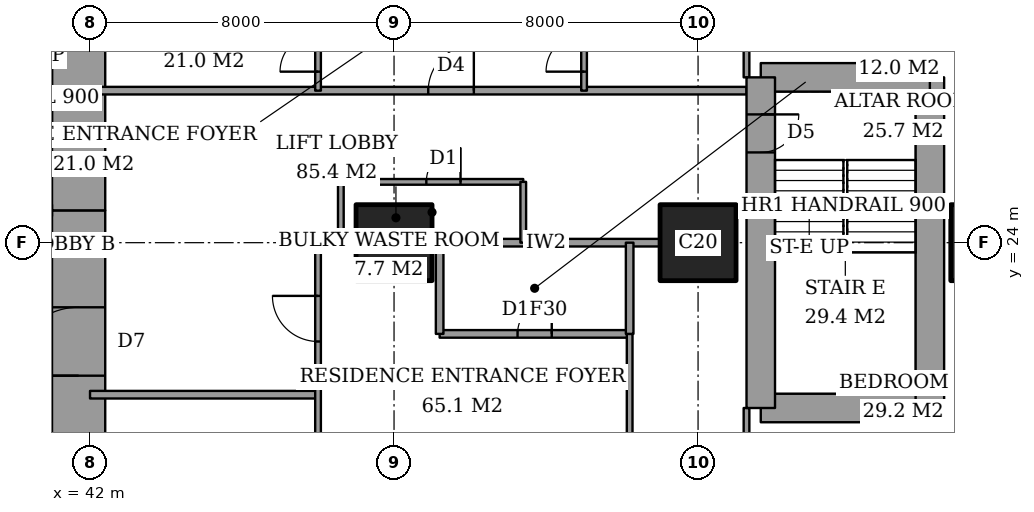
"""IFC4 building model, lengths in metres.
Left out: names, types, materials, properties, quantities, classifications, styles, units other than length and angle.
Written with IfcOpenShell. Run it as: python <this file> out.ifc"""

import sys

from ifc_helpers import new_model, si_unit, direction, frame, frame_2d, origin, origin_2d, place, context, subcontext, project, spatial, rectangle, extrude, element, fill, save


model = new_model("IFC4")
c1 = context("Model", 3, precision=1e-05, world=origin(), true_north=direction((0.0, 1.0)))
c2 = subcontext(c1, "Body", "Model", "MODEL_VIEW")
j1 = project(units=[si_unit("LENGTHUNIT", "METRE"), si_unit("PLANEANGLEUNIT", "RADIAN")], contexts=[c1])
p1 = place(None, origin())
s1 = spatial("IfcSite", under=j1, at=p1, CompositionType="ELEMENT")
p2 = place(p1, origin())
s2 = spatial("IfcBuilding", under=s1, at=p2, CompositionType="ELEMENT")
p3 = place(p2, frame((0.0, 0.0, 33.2)))
s3 = spatial("IfcBuildingStorey", under=s2, at=p3, CompositionType="ELEMENT", Elevation=33.2)
for number, where, z_axis, x_axis in (
    (1, (50.0, 24.0, 0.0), (0.0, 0.0, 1.0), (1.0, 0.0, 0.0)),
    (2, (58.0, 24.0, 0.0), (0.0, 0.0, 1.0), (1.0, 0.0, 0.0)),
    (3, (65.65, 24.0, 0.0), (0.0, 0.0, 1.0), (1.0, 0.0, 0.0)),
):
    element("IfcColumn", number, at=place(p3, frame(where, z_axis=z_axis, x_axis=x_axis)), inside=s3, PredefinedType="COLUMN", context=c2, shape_type="SweptSolid", body=[
        extrude(rectangle(XDim=2.0, YDim=2.0, at=origin_2d()), origin(), (0.0, 0.0, 1.0), 3.6),
    ])
p4 = place(p3, frame((41.7, 13.0, 0.0), z_axis=(0.0, 0.0, 1.0), x_axis=(0.0, 1.0, 0.0)))
e4 = element("IfcWall", 4, at=p4, inside=s3, PredefinedType="SHEAR", context=c2, shape_type="SweptSolid", body=[
    extrude(rectangle(XDim=11.85, YDim=1.4, at=frame_2d((5.925, 0.0))), origin(), (0.0, 0.0, 1.0), 3.6),
])
p5 = place(p4, frame((7.5, 0.0, 0.0)))
e5 = element("IfcOpeningElement", 5, at=p5, cuts=e4, PredefinedType="OPENING", context=c2, shape_type="SweptSolid", body=[
    extrude(rectangle(XDim=1.8, YDim=2.4, at=frame_2d((0.9, 1.2))), frame((0.0, 0.71, 0.0), z_axis=(0.0, -1.0, 0.0), x_axis=(1.0, 0.0, 0.0)), (0.0, 0.0, 1.0), 1.42),
])
p6 = place(p3, frame((41.7, 24.85, 0.0), z_axis=(0.0, 0.0, 1.0), x_axis=(0.0, 1.0, 0.0)))
e6 = element("IfcWall", 6, at=p6, inside=s3, PredefinedType="SHEAR", context=c2, shape_type="SweptSolid", body=[
    extrude(rectangle(XDim=10.15, YDim=1.4, at=frame_2d((5.075, 0.0))), origin(), (0.0, 0.0, 1.0), 3.6),
])
p7 = place(p3, frame((59.65, 19.65, 0.0), z_axis=(0.0, 0.0, 1.0), x_axis=(1.0, 0.0, 0.0)))
e7 = element("IfcWall", 7, at=p7, inside=s3, PredefinedType="SHEAR", context=c2, shape_type="SweptSolid", body=[
    extrude(rectangle(XDim=4.45, YDim=0.75, at=frame_2d((2.225, 0.0))), origin(), (0.0, 0.0, 1.0), 3.6),
])
p8 = place(p3, frame((64.1, 19.65, 0.0), z_axis=(0.0, 0.0, 1.0), x_axis=(0.0, 1.0, 0.0)))
e8 = element("IfcWall", 8, at=p8, inside=s3, PredefinedType="SHEAR", context=c2, shape_type="SweptSolid", body=[
    extrude(rectangle(XDim=8.7, YDim=0.75, at=frame_2d((4.35, 0.0))), origin(), (0.0, 0.0, 1.0), 3.6),
])
p9 = place(p3, frame((64.1, 28.35, 0.0), z_axis=(0.0, 0.0, 1.0), x_axis=(-1.0, 0.0, 0.0)))
e9 = element("IfcWall", 9, at=p9, inside=s3, PredefinedType="SHEAR", context=c2, shape_type="SweptSolid", body=[
    extrude(rectangle(XDim=4.45, YDim=0.75, at=frame_2d((2.225, 0.0))), origin(), (0.0, 0.0, 1.0), 3.6),
])
p10 = place(p3, frame((59.65, 28.35, 0.0), z_axis=(0.0, 0.0, 1.0), x_axis=(0.0, -1.0, 0.0)))
e10 = element("IfcWall", 10, at=p10, inside=s3, PredefinedType="SHEAR", context=c2, shape_type="SweptSolid", body=[
    extrude(rectangle(XDim=8.7, YDim=0.75, at=frame_2d((4.35, 0.0))), origin(), (0.0, 0.0, 1.0), 3.6),
])
p11 = place(p10, frame((0.975, 0.0, 0.0)))
e11 = element("IfcOpeningElement", 11, at=p11, cuts=e10, PredefinedType="OPENING", context=c2, shape_type="SweptSolid", body=[
    extrude(rectangle(XDim=1.0, YDim=2.1, at=frame_2d((0.5, 1.05))), frame((0.0, 0.385, 0.0), z_axis=(0.0, -1.0, 0.0), x_axis=(1.0, 0.0, 0.0)), (0.0, 0.0, 1.0), 0.77),
])
p12 = place(p3, frame((42.0, 20.0, 0.0), z_axis=(0.0, 0.0, 1.0), x_axis=(1.0, 0.0, 0.0)))
e12 = element("IfcWall", 12, at=p12, inside=s3, PredefinedType="PARTITIONING", context=c2, shape_type="SweptSolid", body=[
    extrude(rectangle(XDim=6.0, YDim=0.2, at=frame_2d((3.0, 0.0))), origin(), (0.0, 0.0, 1.0), 3.35),
])
p13 = place(p3, frame((51.2, 21.6, 0.0), z_axis=(0.0, 0.0, 1.0), x_axis=(1.0, 0.0, 0.0)))
e13 = element("IfcWall", 13, at=p13, inside=s3, PredefinedType="PARTITIONING", context=c2, shape_type="SweptSolid", body=[
    extrude(rectangle(XDim=5.0, YDim=0.2, at=frame_2d((2.5, 0.0))), origin(), (0.0, 0.0, 1.0), 3.35),
])
p14 = place(p13, frame((2.05, 0.0, 0.0)))
e14 = element("IfcOpeningElement", 14, at=p14, cuts=e13, PredefinedType="OPENING", context=c2, shape_type="SweptSolid", body=[
    extrude(rectangle(XDim=0.9, YDim=2.1, at=frame_2d((0.45, 1.05))), frame((0.0, 0.11, 0.0), z_axis=(0.0, -1.0, 0.0), x_axis=(1.0, 0.0, 0.0)), (0.0, 0.0, 1.0), 0.22),
])
p15 = place(p3, frame((48.0, 24.0, 0.0), z_axis=(0.0, 0.0, 1.0), x_axis=(1.0, 0.0, 0.0)))
e15 = element("IfcWall", 15, at=p15, inside=s3, PredefinedType="PARTITIONING", context=c2, shape_type="SweptSolid", body=[
    extrude(rectangle(XDim=1.0, YDim=0.2, at=frame_2d((0.5, 0.0))), origin(), (0.0, 0.0, 1.0), 3.35),
])
p16 = place(p3, frame((51.0, 24.0, 0.0), z_axis=(0.0, 0.0, 1.0), x_axis=(1.0, 0.0, 0.0)))
e16 = element("IfcWall", 16, at=p16, inside=s3, PredefinedType="PARTITIONING", context=c2, shape_type="SweptSolid", body=[
    extrude(rectangle(XDim=6.0, YDim=0.2, at=frame_2d((3.0, 0.0))), origin(), (0.0, 0.0, 1.0), 3.35),
])
p17 = place(p3, frame((48.6, 25.6, 0.0), z_axis=(0.0, 0.0, 1.0), x_axis=(1.0, 0.0, 0.0)))
e17 = element("IfcWall", 17, at=p17, inside=s3, PredefinedType="PARTITIONING", context=c2, shape_type="SweptSolid", body=[
    extrude(rectangle(XDim=4.8, YDim=0.15, at=frame_2d((2.4, 0.0))), origin(), (0.0, 0.0, 1.0), 3.35),
])
p18 = place(p17, frame((2.25, 0.0, 0.0)))
e18 = element("IfcOpeningElement", 18, at=p18, cuts=e17, PredefinedType="OPENING", context=c2, shape_type="SweptSolid", body=[
    extrude(rectangle(XDim=0.9, YDim=2.1, at=frame_2d((0.45, 1.05))), frame((0.0, 0.085, 0.0), z_axis=(0.0, -1.0, 0.0), x_axis=(1.0, 0.0, 0.0)), (0.0, 0.0, 1.0), 0.17),
])
p19 = place(p3, frame((42.0, 28.0, 0.0), z_axis=(0.0, 0.0, 1.0), x_axis=(1.0, 0.0, 0.0)))
e19 = element("IfcWall", 19, at=p19, inside=s3, PredefinedType="PARTITIONING", context=c2, shape_type="SweptSolid", body=[
    extrude(rectangle(XDim=17.275, YDim=0.2, at=frame_2d((8.637, 0.0))), origin(), (0.0, 0.0, 1.0), 3.35),
])
p20 = place(p19, frame((8.9, 0.0, 0.0)))
e20 = element("IfcOpeningElement", 20, at=p20, cuts=e19, PredefinedType="OPENING", context=c2, shape_type="SweptSolid", body=[
    extrude(rectangle(XDim=1.2, YDim=2.4, at=frame_2d((0.6, 1.2))), frame((0.0, 0.11, 0.0), z_axis=(0.0, -1.0, 0.0), x_axis=(1.0, 0.0, 0.0)), (0.0, 0.0, 1.0), 0.22),
])
p21 = place(p3, frame((48.0, 10.6, 0.0), z_axis=(0.0, 0.0, 1.0), x_axis=(0.0, 1.0, 0.0)))
e21 = element("IfcWall", 21, at=p21, inside=s3, PredefinedType="PARTITIONING", context=c2, shape_type="SweptSolid", body=[
    extrude(rectangle(XDim=13.4, YDim=0.15, at=frame_2d((6.7, 0.0))), origin(), (0.0, 0.0, 1.0), 3.35),
])
p22 = place(p21, frame((10.8, 0.0, 0.0)))
e22 = element("IfcOpeningElement", 22, at=p22, cuts=e21, PredefinedType="OPENING", context=c2, shape_type="SweptSolid", body=[
    extrude(rectangle(XDim=1.2, YDim=2.4, at=frame_2d((0.6, 1.2))), frame((0.0, 0.085, 0.0), z_axis=(0.0, -1.0, 0.0), x_axis=(1.0, 0.0, 0.0)), (0.0, 0.0, 1.0), 0.17),
])
p23 = place(p21, frame((6.7, 0.0, 0.0)))
e23 = element("IfcOpeningElement", 23, at=p23, cuts=e21, PredefinedType="OPENING", context=c2, shape_type="SweptSolid", body=[
    extrude(rectangle(XDim=0.9, YDim=2.1, at=frame_2d((0.45, 1.05))), frame((0.0, 0.085, 0.0), z_axis=(0.0, -1.0, 0.0), x_axis=(1.0, 0.0, 0.0)), (0.0, 0.0, 1.0), 0.17),
])
p24 = place(p3, frame((48.0, 28.0, 0.0), z_axis=(0.0, 0.0, 1.0), x_axis=(0.0, 1.0, 0.0)))
e24 = element("IfcWall", 24, at=p24, inside=s3, PredefinedType="PARTITIONING", context=c2, shape_type="SweptSolid", body=[
    extrude(rectangle(XDim=9.4, YDim=0.15, at=frame_2d((4.7, 0.0))), origin(), (0.0, 0.0, 1.0), 3.35),
])
p25 = place(p24, frame((0.5, 0.0, 0.0)))
e25 = element("IfcOpeningElement", 25, at=p25, cuts=e24, PredefinedType="OPENING", context=c2, shape_type="SweptSolid", body=[
    extrude(rectangle(XDim=1.0, YDim=2.1, at=frame_2d((0.5, 1.05))), frame((0.0, 0.085, 0.0), z_axis=(0.0, -1.0, 0.0), x_axis=(1.0, 0.0, 0.0)), (0.0, 0.0, 1.0), 0.17),
])
p26 = place(p3, frame((48.6, 24.0, 0.0), z_axis=(0.0, 0.0, 1.0), x_axis=(0.0, 1.0, 0.0)))
e26 = element("IfcWall", 26, at=p26, inside=s3, PredefinedType="PARTITIONING", context=c2, shape_type="SweptSolid", body=[
    extrude(rectangle(XDim=1.6, YDim=0.15, at=frame_2d((0.8, 0.0))), origin(), (0.0, 0.0, 1.0), 3.35),
])
p27 = place(p3, frame((51.2, 21.6, 0.0), z_axis=(0.0, 0.0, 1.0), x_axis=(0.0, 1.0, 0.0)))
e27 = element("IfcWall", 27, at=p27, inside=s3, PredefinedType="PARTITIONING", context=c2, shape_type="SweptSolid", body=[
    extrude(rectangle(XDim=2.4, YDim=0.2, at=frame_2d((1.2, 0.0))), origin(), (0.0, 0.0, 1.0), 3.35),
])
p28 = place(p3, frame((53.4, 24.0, 0.0), z_axis=(0.0, 0.0, 1.0), x_axis=(0.0, 1.0, 0.0)))
e28 = element("IfcWall", 28, at=p28, inside=s3, PredefinedType="PARTITIONING", context=c2, shape_type="SweptSolid", body=[
    extrude(rectangle(XDim=1.6, YDim=0.15, at=frame_2d((0.8, 0.0))), origin(), (0.0, 0.0, 1.0), 3.35),
])
p29 = place(p3, frame((55.0, 28.0, 0.0), z_axis=(0.0, 0.0, 1.0), x_axis=(0.0, 1.0, 0.0)))
e29 = element("IfcWall", 29, at=p29, inside=s3, PredefinedType="PARTITIONING", context=c2, shape_type="SweptSolid", body=[
    extrude(rectangle(XDim=9.4, YDim=0.15, at=frame_2d((4.7, 0.0))), origin(), (0.0, 0.0, 1.0), 3.35),
])
p30 = place(p29, frame((0.5, 0.0, 0.0)))
e30 = element("IfcOpeningElement", 30, at=p30, cuts=e29, PredefinedType="OPENING", context=c2, shape_type="SweptSolid", body=[
    extrude(rectangle(XDim=1.0, YDim=2.1, at=frame_2d((0.5, 1.05))), frame((0.0, 0.085, 0.0), z_axis=(0.0, -1.0, 0.0), x_axis=(1.0, 0.0, 0.0)), (0.0, 0.0, 1.0), 0.17),
])
p31 = place(p3, frame((56.2, 21.6, 0.0), z_axis=(0.0, 0.0, 1.0), x_axis=(0.0, 1.0, 0.0)))
e31 = element("IfcWall", 31, at=p31, inside=s3, PredefinedType="PARTITIONING", context=c2, shape_type="SweptSolid", body=[
    extrude(rectangle(XDim=2.4, YDim=0.2, at=frame_2d((1.2, 0.0))), origin(), (0.0, 0.0, 1.0), 3.35),
])
p32 = place(p3, frame((56.2, 10.6, 0.0), z_axis=(0.0, 0.0, 1.0), x_axis=(0.0, 1.0, 0.0)))
e32 = element("IfcWall", 32, at=p32, inside=s3, PredefinedType="PARTITIONING", context=c2, shape_type="SweptSolid", body=[
    extrude(rectangle(XDim=11.0, YDim=0.15, at=frame_2d((5.5, 0.0))), origin(), (0.0, 0.0, 1.0), 3.35),
])
p33 = place(p32, frame((7.0, 0.0, 0.0)))
e33 = element("IfcOpeningElement", 33, at=p33, cuts=e32, PredefinedType="OPENING", context=c2, shape_type="SweptSolid", body=[
    extrude(rectangle(XDim=1.0, YDim=2.1, at=frame_2d((0.5, 1.05))), frame((0.0, 0.085, 0.0), z_axis=(0.0, -1.0, 0.0), x_axis=(1.0, 0.0, 0.0)), (0.0, 0.0, 1.0), 0.17),
])
p34 = place(p3, frame((59.275, 17.2, 0.0), z_axis=(0.0, 0.0, 1.0), x_axis=(0.0, 1.0, 0.0)))
e34 = element("IfcWall", 34, at=p34, inside=s3, PredefinedType="PARTITIONING", context=c2, shape_type="SweptSolid", body=[
    extrude(rectangle(XDim=2.45, YDim=0.15, at=frame_2d((1.225, 0.0))), origin(), (0.0, 0.0, 1.0), 3.35),
])
p35 = place(p34, frame((0.538, 0.0, 0.0)))
e35 = element("IfcOpeningElement", 35, at=p35, cuts=e34, PredefinedType="OPENING", context=c2, shape_type="SweptSolid", body=[
    extrude(rectangle(XDim=1.0, YDim=2.1, at=frame_2d((0.5, 1.05))), frame((0.0, 0.085, 0.0), z_axis=(0.0, -1.0, 0.0), x_axis=(1.0, 0.0, 0.0)), (0.0, 0.0, 1.0), 0.17),
])
p36 = place(p3, frame((59.275, 28.35, 0.0), z_axis=(0.0, 0.0, 1.0), x_axis=(0.0, 1.0, 0.0)))
e36 = element("IfcWall", 36, at=p36, inside=s3, PredefinedType="PARTITIONING", context=c2, shape_type="SweptSolid", body=[
    extrude(rectangle(XDim=2.45, YDim=0.15, at=frame_2d((1.225, 0.0))), origin(), (0.0, 0.0, 1.0), 3.35),
])
p37 = place(p36, frame((0.913, 0.0, 0.0)))
e37 = element("IfcOpeningElement", 37, at=p37, cuts=e36, PredefinedType="OPENING", context=c2, shape_type="SweptSolid", body=[
    extrude(rectangle(XDim=1.0, YDim=2.1, at=frame_2d((0.5, 1.05))), frame((0.0, 0.085, 0.0), z_axis=(0.0, -1.0, 0.0), x_axis=(1.0, 0.0, 0.0)), (0.0, 0.0, 1.0), 0.17),
])
p38 = place(p14, origin())
e38 = element("IfcDoor", 38, at=p38, inside=s3, OperationType="SINGLE_SWING_LEFT", PredefinedType="DOOR", context=c2, shape_type="SweptSolid", body=[
    extrude(rectangle(XDim=0.9, YDim=2.1, at=frame_2d((0.45, 1.05))), frame((0.0, 0.025, 0.0), z_axis=(0.0, -1.0, 0.0), x_axis=(1.0, 0.0, 0.0)), (0.0, 0.0, 1.0), 0.05),
])
fill(e14, e38)
p39 = place(p22, origin())
e39 = element("IfcDoor", 39, at=p39, inside=s3, OperationType="SINGLE_SWING_LEFT", PredefinedType="DOOR", context=c2, shape_type="SweptSolid", body=[
    extrude(rectangle(XDim=1.2, YDim=2.4, at=frame_2d((0.6, 1.2))), frame((0.0, 0.025, 0.0), z_axis=(0.0, -1.0, 0.0), x_axis=(1.0, 0.0, 0.0)), (0.0, 0.0, 1.0), 0.05),
])
fill(e22, e39)
p40 = place(p30, origin())
e40 = element("IfcDoor", 40, at=p40, inside=s3, OperationType="SINGLE_SWING_RIGHT", PredefinedType="DOOR", context=c2, shape_type="SweptSolid", body=[
    extrude(rectangle(XDim=1.0, YDim=2.1, at=frame_2d((0.5, 1.05))), frame((0.0, 0.025, 0.0), z_axis=(0.0, -1.0, 0.0), x_axis=(1.0, 0.0, 0.0)), (0.0, 0.0, 1.0), 0.05),
])
fill(e30, e40)
p41 = place(p20, origin())
e41 = element("IfcDoor", 41, at=p41, inside=s3, OperationType="SINGLE_SWING_LEFT", PredefinedType="DOOR", context=c2, shape_type="SweptSolid", body=[
    extrude(rectangle(XDim=1.2, YDim=2.4, at=frame_2d((0.6, 1.2))), frame((0.0, 0.025, 0.0), z_axis=(0.0, -1.0, 0.0), x_axis=(1.0, 0.0, 0.0)), (0.0, 0.0, 1.0), 0.05),
])
fill(e20, e41)
p42 = place(p25, origin())
e42 = element("IfcDoor", 42, at=p42, inside=s3, OperationType="SINGLE_SWING_RIGHT", PredefinedType="DOOR", context=c2, shape_type="SweptSolid", body=[
    extrude(rectangle(XDim=1.0, YDim=2.1, at=frame_2d((0.5, 1.05))), frame((0.0, 0.025, 0.0), z_axis=(0.0, -1.0, 0.0), x_axis=(1.0, 0.0, 0.0)), (0.0, 0.0, 1.0), 0.05),
])
fill(e25, e42)
p43 = place(p18, origin())
e43 = element("IfcDoor", 43, at=p43, inside=s3, OperationType="SINGLE_SWING_LEFT", PredefinedType="DOOR", context=c2, shape_type="SweptSolid", body=[
    extrude(rectangle(XDim=0.9, YDim=2.1, at=frame_2d((0.45, 1.05))), frame((0.0, 0.025, 0.0), z_axis=(0.0, -1.0, 0.0), x_axis=(1.0, 0.0, 0.0)), (0.0, 0.0, 1.0), 0.05),
])
fill(e18, e43)
p44 = place(p5, origin())
e44 = element("IfcDoor", 44, at=p44, inside=s3, OperationType="DOUBLE_DOOR_DOUBLE_SWING", PredefinedType="DOOR", context=c2, shape_type="SweptSolid", body=[
    extrude(rectangle(XDim=1.8, YDim=2.4, at=frame_2d((0.9, 1.2))), frame((0.0, 0.025, 0.0), z_axis=(0.0, -1.0, 0.0), x_axis=(1.0, 0.0, 0.0)), (0.0, 0.0, 1.0), 0.05),
])
fill(e5, e44)
p45 = place(p11, origin())
e45 = element("IfcDoor", 45, at=p45, inside=s3, OperationType="SINGLE_SWING_RIGHT", PredefinedType="DOOR", context=c2, shape_type="SweptSolid", body=[
    extrude(rectangle(XDim=1.0, YDim=2.1, at=frame_2d((0.5, 1.05))), frame((0.0, 0.025, 0.0), z_axis=(0.0, -1.0, 0.0), x_axis=(1.0, 0.0, 0.0)), (0.0, 0.0, 1.0), 0.05),
])
fill(e11, e45)
save(model, sys.argv[1])
